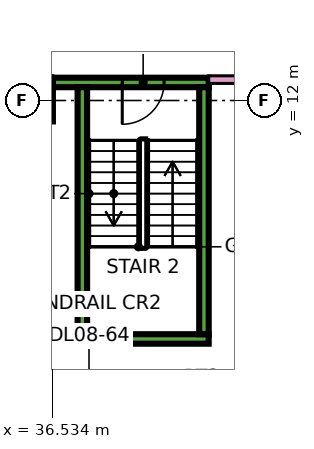
"""IFC4 building model, lengths in metres.
Left out: names, types, materials, properties, quantities, classifications, styles, units other than length and angle.
Written with IfcOpenShell. Run it as: python <this file> out.ifc"""

import sys

from ifc_helpers import new_model, si_unit, direction, frame, frame_2d, origin, origin_2d, place, context, subcontext, project, spatial, rectangle, extrude, element, fill, save


model = new_model("IFC4")
c1 = context("Model", 3, precision=1e-05, world=origin(), true_north=direction((0.0, 1.0)))
c2 = subcontext(c1, "Body", "Model", "MODEL_VIEW")
j1 = project(units=[si_unit("LENGTHUNIT", "METRE"), si_unit("PLANEANGLEUNIT", "RADIAN")], contexts=[c1])
p1 = place(None, origin())
s1 = spatial("IfcSite", under=j1, at=p1, CompositionType="ELEMENT")
p2 = place(p1, origin())
s2 = spatial("IfcBuilding", under=s1, at=p2, CompositionType="ELEMENT")
p3 = place(p2, frame((0.0, 0.0, 45.15)))
s3 = spatial("IfcBuildingStorey", under=s2, at=p3, CompositionType="ELEMENT", Elevation=45.15)
p4 = place(p3, frame((36.0, 12.0, 0.0), z_axis=(0.0, 0.0, 1.0), x_axis=(1.0, 0.0, 0.0)))
e1 = element("IfcColumn", 1, at=p4, inside=s3, PredefinedType="COLUMN", context=c2, shape_type="SweptSolid", body=[
    extrude(rectangle(XDim=1.1, YDim=1.1, at=origin_2d()), origin(), (0.0, 0.0, 1.0), 3.75),
])
p5 = place(p3, frame((37.2, 5.725, 0.0), z_axis=(0.0, 0.0, 1.0), x_axis=(1.0, 0.0, 0.0)))
e2 = element("IfcWall", 2, at=p5, inside=s3, PredefinedType="SHEAR", context=c2, shape_type="SweptSolid", body=[
    extrude(rectangle(XDim=3.45, YDim=0.25, at=frame_2d((1.725, 0.0))), origin(), (0.0, 0.0, 1.0), 3.75),
])
p6 = place(p3, frame((36.55, 12.475, 0.0), z_axis=(0.0, 0.0, 1.0), x_axis=(1.0, 0.0, 0.0)))
e3 = element("IfcWall", 3, at=p6, inside=s3, PredefinedType="SHEAR", context=c2, shape_type="SweptSolid", body=[
    extrude(rectangle(XDim=4.1, YDim=0.25, at=frame_2d((2.05, 0.0))), origin(), (0.0, 0.0, 1.0), 3.75),
])
p7 = place(p6, frame((1.825, 0.0, 0.0)))
e4 = element("IfcOpeningElement", 4, at=p7, cuts=e3, PredefinedType="OPENING", context=c2, shape_type="SweptSolid", body=[
    extrude(rectangle(XDim=1.1, YDim=2.2, at=frame_2d((0.55, 1.1))), frame((0.0, 0.135, 0.0), z_axis=(0.0, -1.0, 0.0), x_axis=(1.0, 0.0, 0.0)), (0.0, 0.0, 1.0), 0.27),
])
for number, where, z_axis, x_axis in (
    (5, (37.325, 5.85, 0.0), (0.0, 0.0, 1.0), (0.0, 1.0, 0.0)),
    (6, (40.525, 5.85, 0.0), (0.0, 0.0, 1.0), (0.0, 1.0, 0.0)),
):
    element("IfcWall", number, at=place(p3, frame(where, z_axis=z_axis, x_axis=x_axis)), inside=s3, PredefinedType="SHEAR", context=c2, shape_type="SweptSolid", body=[
        extrude(rectangle(XDim=6.5, YDim=0.25, at=frame_2d((3.25, 0.0))), origin(), (0.0, 0.0, 1.0), 3.75),
    ])
p8 = place(p3, frame((34.0, 12.55, 0.0), z_axis=(0.0, 0.0, 1.0), x_axis=(1.0, 0.0, 0.0)))
e7 = element("IfcWall", 7, at=p8, inside=s3, PredefinedType="PARTITIONING", context=c2, shape_type="SweptSolid", body=[
    extrude(rectangle(XDim=2.551, YDim=0.2, at=frame_2d((1.275, 0.0))), origin(), (0.0, 0.0, 1.0), 3.35),
])
p9 = place(p3, frame((40.65, 12.55, 0.0), z_axis=(0.0, 0.0, 1.0), x_axis=(1.0, 0.0, 0.0)))
e8 = element("IfcWall", 8, at=p9, inside=s3, PredefinedType="PARTITIONING", context=c2, shape_type="SweptSolid", body=[
    extrude(rectangle(XDim=31.276, YDim=0.2, at=frame_2d((15.638, 0.0))), origin(), (0.0, 0.0, 1.0), 3.35),
])
p10 = place(p9, frame((17.4, 0.0, 0.0)))
e9 = element("IfcOpeningElement", 9, at=p10, cuts=e8, PredefinedType="OPENING", context=c2, shape_type="SweptSolid", body=[
    extrude(rectangle(XDim=1.0, YDim=2.1, at=frame_2d((0.5, 1.05))), frame((0.0, 0.11, 0.0), z_axis=(0.0, -1.0, 0.0), x_axis=(1.0, 0.0, 0.0)), (0.0, 0.0, 1.0), 0.22),
])
p11 = place(p9, frame((26.25, 0.0, 0.0)))
e10 = element("IfcOpeningElement", 10, at=p11, cuts=e8, PredefinedType="OPENING", context=c2, shape_type="SweptSolid", body=[
    extrude(rectangle(XDim=1.0, YDim=2.1, at=frame_2d((0.5, 1.05))), frame((0.0, 0.11, 0.0), z_axis=(0.0, -1.0, 0.0), x_axis=(1.0, 0.0, 0.0)), (0.0, 0.0, 1.0), 0.22),
])
p12 = place(p9, frame((1.05, 0.0, 0.0)))
e11 = element("IfcOpeningElement", 11, at=p12, cuts=e8, PredefinedType="OPENING", context=c2, shape_type="SweptSolid", body=[
    extrude(rectangle(XDim=1.0, YDim=2.1, at=frame_2d((0.5, 1.05))), frame((0.0, 0.11, 0.0), z_axis=(0.0, -1.0, 0.0), x_axis=(1.0, 0.0, 0.0)), (0.0, 0.0, 1.0), 0.22),
])
p13 = place(p7, frame((1.1, 0.0, 0.0), z_axis=(0.0, 0.0, 1.0), x_axis=(-1.0, 0.0, 0.0)))
e12 = element("IfcDoor", 12, at=p13, inside=s3, OperationType="SINGLE_SWING_LEFT", PredefinedType="DOOR", context=c2, shape_type="SweptSolid", body=[
    extrude(rectangle(XDim=1.1, YDim=2.2, at=frame_2d((0.55, 1.1))), frame((0.0, 0.025, 0.0), z_axis=(0.0, -1.0, 0.0), x_axis=(1.0, 0.0, 0.0)), (0.0, 0.0, 1.0), 0.05),
])
fill(e4, e12)
save(model, sys.argv[1])
